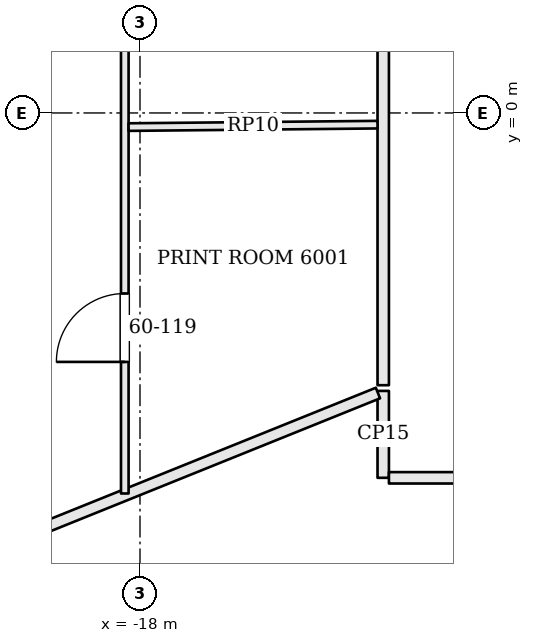
"""IFC4 building model, lengths in metres.
Left out: names, types, materials, properties, quantities, classifications, styles, units other than length and angle.
Written with IfcOpenShell. Run it as: python <this file> out.ifc"""

import sys

from ifc_helpers import new_model, si_unit, direction, frame, frame_2d, origin, place, context, subcontext, project, spatial, rectangle, extrude, element, fill, save


model = new_model("IFC4")
c1 = context("Model", 3, precision=1e-05, world=origin(), true_north=direction((0.0, 1.0)))
c2 = subcontext(c1, "Body", "Model", "MODEL_VIEW")
j1 = project(units=[si_unit("LENGTHUNIT", "METRE"), si_unit("PLANEANGLEUNIT", "RADIAN")], contexts=[c1])
p1 = place(None, origin())
s1 = spatial("IfcSite", under=j1, at=p1, CompositionType="ELEMENT")
p2 = place(p1, origin())
s2 = spatial("IfcBuilding", under=s1, at=p2, CompositionType="ELEMENT")
p3 = place(p2, frame((0.0, 0.0, 244.8)))
s3 = spatial("IfcBuildingStorey", under=s2, at=p3, CompositionType="ELEMENT", Elevation=244.8)
p4 = place(p3, frame((-14.8, -3.657, 0.0), z_axis=(0.0, 0.0, 1.0), x_axis=(0.0, -1.0, 0.0)))
e1 = element("IfcWall", 1, at=p4, inside=s3, PredefinedType="PARTITIONING", context=c2, shape_type="SweptSolid", body=[
    extrude(rectangle(XDim=1.143, YDim=0.15, at=frame_2d((0.572, 0.0))), origin(), (0.0, 0.0, 1.0), 3.084),
])
p5 = place(p3, frame((-14.725, -4.8, 0.0), z_axis=(0.0, 0.0, 1.0), x_axis=(1.0, 0.0, 0.0)))
e2 = element("IfcWall", 2, at=p5, inside=s3, PredefinedType="PARTITIONING", context=c2, shape_type="SweptSolid", body=[
    extrude(rectangle(XDim=9.987, YDim=0.15, at=frame_2d((4.993, 0.0))), origin(), (0.0, 0.0, 1.0), 3.084),
])
p6 = place(p5, frame((3.484, 0.0, 0.0)))
e3 = element("IfcOpeningElement", 3, at=p6, cuts=e2, PredefinedType="OPENING", context=c2, shape_type="SweptSolid", body=[
    extrude(rectangle(XDim=1.8, YDim=2.1, at=frame_2d((0.9, 1.05))), frame((0.0, 0.085, 0.0), z_axis=(0.0, -1.0, 0.0), x_axis=(1.0, 0.0, 0.0)), (0.0, 0.0, 1.0), 0.17),
])
p7 = place(p3, frame((-26.795, -8.494, 0.0), z_axis=(0.0, 0.0, 1.0), x_axis=(0.927430744247, 0.373994939304, 0.0)))
e4 = element("IfcWall", 4, at=p7, inside=s3, PredefinedType="PARTITIONING", context=c2, shape_type="SweptSolid", body=[
    extrude(rectangle(XDim=12.859, YDim=0.15, at=frame_2d((6.429, 0.0))), origin(), (0.0, 0.0, 1.0), 3.084),
])
p8 = place(p3, frame((-14.8, 12.376, 0.0), z_axis=(0.0, 0.0, 1.0), x_axis=(0.0, -1.0, 0.0)))
e5 = element("IfcWall", 5, at=p8, inside=s3, PredefinedType="PARTITIONING", context=c2, shape_type="SweptSolid", body=[
    extrude(rectangle(XDim=15.958, YDim=0.15, at=frame_2d((7.979, 0.0))), origin(), (0.0, 0.0, 1.0), 3.084),
])
p9 = place(p8, frame((1.521, 0.0, 0.0)))
e6 = element("IfcOpeningElement", 6, at=p9, cuts=e5, PredefinedType="OPENING", context=c2, shape_type="SweptSolid", body=[
    extrude(rectangle(XDim=1.8, YDim=2.1, at=frame_2d((0.9, 1.05))), frame((0.0, 0.085, 0.0), z_axis=(0.0, -1.0, 0.0), x_axis=(1.0, 0.0, 0.0)), (0.0, 0.0, 1.0), 0.17),
])
p10 = place(p8, frame((6.338, 0.0, 0.0)))
e7 = element("IfcOpeningElement", 7, at=p10, cuts=e5, PredefinedType="OPENING", context=c2, shape_type="SweptSolid", body=[
    extrude(rectangle(XDim=1.0, YDim=2.4, at=frame_2d((0.5, 1.2))), frame((0.0, 0.085, 0.0), z_axis=(0.0, -1.0, 0.0), x_axis=(1.0, 0.0, 0.0)), (0.0, 0.0, 1.0), 0.17),
])
p11 = place(p3, frame((-18.2, -5.006, 0.0), z_axis=(0.0, 0.0, 1.0), x_axis=(0.0, 1.0, 0.0)))
e8 = element("IfcWall", 8, at=p11, inside=s3, PredefinedType="PARTITIONING", context=c2, shape_type="SweptSolid", body=[
    extrude(rectangle(XDim=21.26, YDim=0.1, at=frame_2d((10.63, 0.0))), origin(), (0.0, 0.0, 1.0), 3.084),
])
p12 = place(p11, frame((18.745, 0.0, 0.0)))
e9 = element("IfcOpeningElement", 9, at=p12, cuts=e8, PredefinedType="OPENING", context=c2, shape_type="SweptSolid", body=[
    extrude(rectangle(XDim=1.0, YDim=2.1, at=frame_2d((0.5, 1.05))), frame((0.0, 0.06, 0.0), z_axis=(0.0, -1.0, 0.0), x_axis=(1.0, 0.0, 0.0)), (0.0, 0.0, 1.0), 0.12),
])
p13 = place(p11, frame((6.489, 0.0, 0.0)))
e10 = element("IfcOpeningElement", 10, at=p13, cuts=e8, PredefinedType="OPENING", context=c2, shape_type="SweptSolid", body=[
    extrude(rectangle(XDim=0.9, YDim=2.1, at=frame_2d((0.45, 1.05))), frame((0.0, 0.06, 0.0), z_axis=(0.0, -1.0, 0.0), x_axis=(1.0, 0.0, 0.0)), (0.0, 0.0, 1.0), 0.12),
])
p14 = place(p11, frame((1.731, 0.0, 0.0)))
e11 = element("IfcOpeningElement", 11, at=p14, cuts=e8, PredefinedType="OPENING", context=c2, shape_type="SweptSolid", body=[
    extrude(rectangle(XDim=0.9, YDim=2.1, at=frame_2d((0.45, 1.05))), frame((0.0, 0.06, 0.0), z_axis=(0.0, -1.0, 0.0), x_axis=(1.0, 0.0, 0.0)), (0.0, 0.0, 1.0), 0.12),
])
p15 = place(p3, frame((-14.875, -0.154, 0.0), z_axis=(0.0, 0.0, 1.0), x_axis=(-0.999952316851, -0.009765450537, 0.0)))
e12 = element("IfcWall", 12, at=p15, inside=s3, PredefinedType="PARTITIONING", context=c2, shape_type="SweptSolid", body=[
    extrude(rectangle(XDim=3.275, YDim=0.1, at=frame_2d((1.638, 0.0))), origin(), (0.0, 0.0, 1.0), 3.084),
])
p16 = place(p14, origin())
e13 = element("IfcDoor", 13, at=p16, inside=s3, OperationType="SINGLE_SWING_LEFT", PredefinedType="DOOR", context=c2, shape_type="SweptSolid", body=[
    extrude(rectangle(XDim=0.9, YDim=2.1, at=frame_2d((0.45, 1.05))), frame((0.0, 0.025, 0.0), z_axis=(0.0, -1.0, 0.0), x_axis=(1.0, 0.0, 0.0)), (0.0, 0.0, 1.0), 0.05),
])
fill(e11, e13)
save(model, sys.argv[1])
